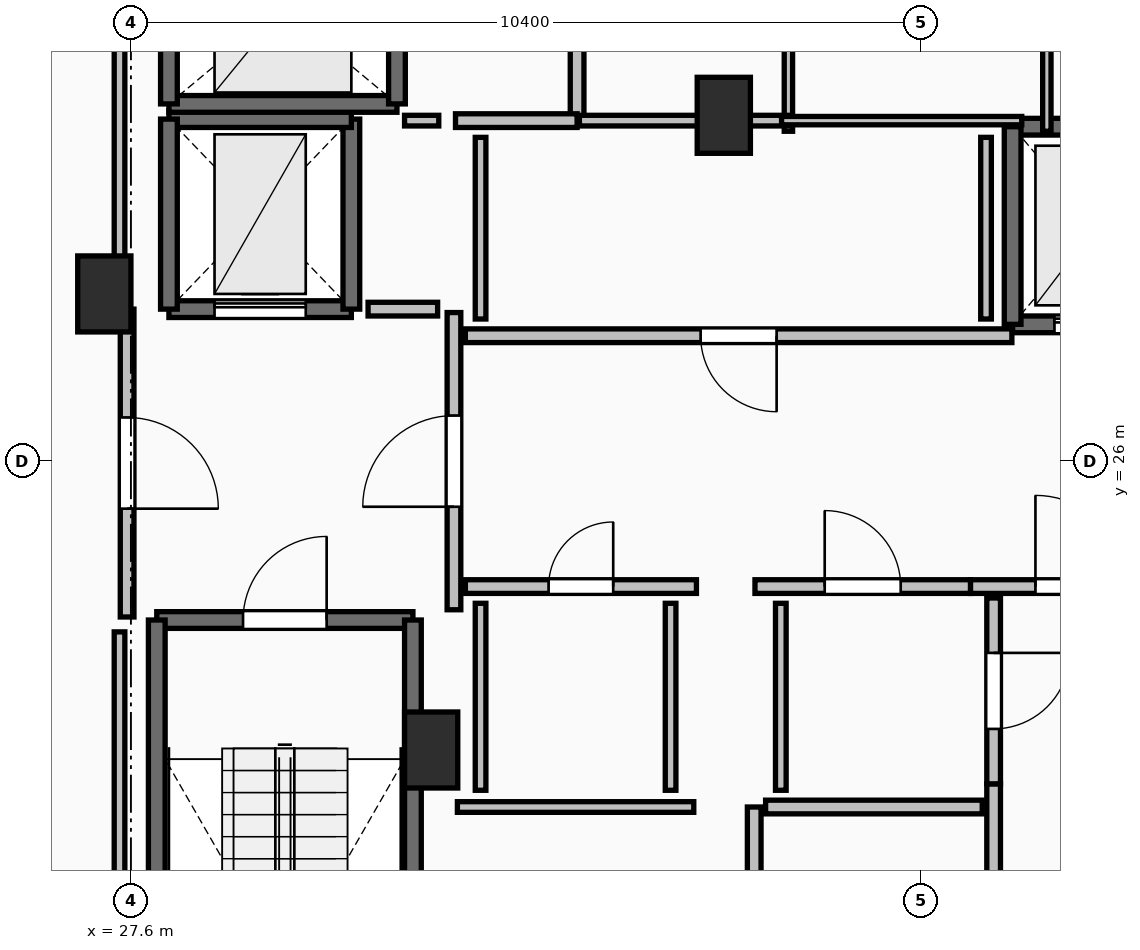
"""IFC4 building model, lengths in metres.
Left out: names, types, materials, properties, quantities, classifications, styles, units other than length and angle.
Written with IfcOpenShell. Run it as: python <this file> out.ifc"""

import sys

from ifc_helpers import new_model, si_unit, direction, frame, frame_2d, origin, origin_2d, place, context, subcontext, project, spatial, rectangle, extrude, element, fill, save


model = new_model("IFC4")
c1 = context("Model", 3, precision=1e-05, world=origin(), true_north=direction((0.0, 1.0)))
c2 = subcontext(c1, "Body", "Model", "MODEL_VIEW")
j1 = project(units=[si_unit("LENGTHUNIT", "METRE"), si_unit("PLANEANGLEUNIT", "RADIAN")], contexts=[c1])
p1 = place(None, origin())
s1 = spatial("IfcSite", under=j1, at=p1, CompositionType="ELEMENT")
p2 = place(p1, origin())
s2 = spatial("IfcBuilding", under=s1, at=p2, CompositionType="ELEMENT")
p3 = place(p2, frame((0.0, 0.0, 252.0)))
s3 = spatial("IfcBuildingStorey", under=s2, at=p3, CompositionType="ELEMENT", Elevation=252.0)
for number, where, z_axis, x_axis in (
    (1, (27.25, 28.2, 0.0), (0.0, 0.0, 1.0), (1.0, 0.0, 0.0)),
    (2, (31.55, 22.2, 0.0), (0.0, 0.0, 1.0), (1.0, 0.0, 0.0)),
    (3, (35.4, 30.55, 0.0), (0.0, 0.0, 1.0), (1.0, 0.0, 0.0)),
):
    element("IfcColumn", number, at=place(p3, frame(where, z_axis=z_axis, x_axis=x_axis)), inside=s3, PredefinedType="PILASTER", context=c2, shape_type="SweptSolid", body=[
        extrude(rectangle(XDim=0.7, YDim=1.0, at=origin_2d()), origin(), (0.0, 0.0, 1.0), 3.55),
    ])
p4 = place(p3, frame((27.94, 23.91, 0.0), z_axis=(0.0, 0.0, 1.0), x_axis=(1.0, 0.0, 0.0)))
e4 = element("IfcWall", 4, at=p4, inside=s3, PredefinedType="SOLIDWALL", context=c2, shape_type="SweptSolid", body=[
    extrude(rectangle(XDim=3.37, YDim=0.22, at=frame_2d((1.685, 0.0))), origin(), (0.0, 0.0, 1.0), 3.29),
])
p5 = place(p4, frame((1.135, 0.0, 0.0)))
e5 = element("IfcOpeningElement", 5, at=p5, cuts=e4, PredefinedType="OPENING", context=c2, shape_type="SweptSolid", body=[
    extrude(rectangle(XDim=1.1, YDim=2.15, at=frame_2d((0.55, 1.075))), frame((0.0, 0.125, 0.0), z_axis=(0.0, -1.0, 0.0), x_axis=(1.0, 0.0, 0.0)), (0.0, 0.0, 1.0), 0.25),
])
for number, where, z_axis, x_axis in (
    (6, (31.31, 23.91, 0.0), (0.0, 0.0, 1.0), (0.0, -1.0, 0.0)),
    (7, (27.94, 16.49, 0.0), (0.0, 0.0, 1.0), (0.0, 1.0, 0.0)),
):
    element("IfcWall", number, at=place(p3, frame(where, z_axis=z_axis, x_axis=x_axis)), inside=s3, PredefinedType="SOLIDWALL", context=c2, shape_type="SweptSolid", body=[
        extrude(rectangle(XDim=7.42, YDim=0.22, at=frame_2d((3.71, 0.0))), origin(), (0.0, 0.0, 1.0), 3.29),
    ])
p6 = place(p3, frame((39.2, 27.8, 0.0), z_axis=(0.0, 0.0, 1.0), x_axis=(1.0, 0.0, 0.0)))
e8 = element("IfcWall", 8, at=p6, inside=s3, PredefinedType="SOLIDWALL", context=c2, shape_type="SweptSolid", body=[
    extrude(rectangle(XDim=2.2, YDim=0.22, at=frame_2d((1.1, 0.0))), origin(), (0.0, 0.0, 1.0), 3.29),
])
p7 = place(p6, frame((0.55, 0.0, 0.0)))
e9 = element("IfcOpeningElement", 9, at=p7, cuts=e8, PredefinedType="OPENING", context=c2, shape_type="SweptSolid", body=[
    extrude(rectangle(XDim=1.1, YDim=2.2, at=frame_2d((0.55, 1.1))), frame((0.0, 0.125, 0.0), z_axis=(0.0, -1.0, 0.0), x_axis=(1.0, 0.0, 0.0)), (0.0, 0.0, 1.0), 0.25),
])
p8 = place(p3, frame((41.4, 30.4, 0.0), z_axis=(0.0, 0.0, 1.0), x_axis=(-1.0, 0.0, 0.0)))
e10 = element("IfcWall", 10, at=p8, inside=s3, PredefinedType="SOLIDWALL", context=c2, shape_type="SweptSolid", body=[
    extrude(rectangle(XDim=2.2, YDim=0.22, at=frame_2d((1.1, 0.0))), origin(), (0.0, 0.0, 1.0), 3.29),
])
p9 = place(p3, frame((39.2, 30.4, 0.0), z_axis=(0.0, 0.0, 1.0), x_axis=(0.0, -1.0, 0.0)))
e11 = element("IfcWall", 11, at=p9, inside=s3, PredefinedType="SOLIDWALL", context=c2, shape_type="SweptSolid", body=[
    extrude(rectangle(XDim=2.6, YDim=0.22, at=frame_2d((1.3, 0.0))), origin(), (0.0, 0.0, 1.0), 3.29),
])
p10 = place(p3, frame((28.1, 28.0, 0.0), z_axis=(0.0, 0.0, 1.0), x_axis=(1.0, 0.0, 0.0)))
e12 = element("IfcWall", 12, at=p10, inside=s3, PredefinedType="SHEAR", context=c2, shape_type="SweptSolid", body=[
    extrude(rectangle(XDim=2.4, YDim=0.22, at=frame_2d((1.2, 0.0))), origin(), (0.0, 0.0, 1.0), 3.29),
])
p11 = place(p10, frame((0.6, 0.0, 0.0)))
e13 = element("IfcOpeningElement", 13, at=p11, cuts=e12, PredefinedType="OPENING", context=c2, shape_type="SweptSolid", body=[
    extrude(rectangle(XDim=1.2, YDim=2.2, at=frame_2d((0.6, 1.1))), frame((0.0, 0.125, 0.0), z_axis=(0.0, -1.0, 0.0), x_axis=(1.0, 0.0, 0.0)), (0.0, 0.0, 1.0), 0.25),
])
p12 = place(p3, frame((30.5, 28.0, 0.0), z_axis=(0.0, 0.0, 1.0), x_axis=(0.0, 1.0, 0.0)))
e14 = element("IfcWall", 14, at=p12, inside=s3, PredefinedType="SHEAR", context=c2, shape_type="SweptSolid", body=[
    extrude(rectangle(XDim=2.5, YDim=0.22, at=frame_2d((1.25, 0.0))), origin(), (0.0, 0.0, 1.0), 3.29),
])
p13 = place(p3, frame((30.5, 30.5, 0.0), z_axis=(0.0, 0.0, 1.0), x_axis=(-1.0, 0.0, 0.0)))
e15 = element("IfcWall", 15, at=p13, inside=s3, PredefinedType="SHEAR", context=c2, shape_type="SweptSolid", body=[
    extrude(rectangle(XDim=2.4, YDim=0.22, at=frame_2d((1.2, 0.0))), origin(), (0.0, 0.0, 1.0), 3.29),
])
p14 = place(p3, frame((28.1, 30.5, 0.0), z_axis=(0.0, 0.0, 1.0), x_axis=(0.0, -1.0, 0.0)))
e16 = element("IfcWall", 16, at=p14, inside=s3, PredefinedType="SHEAR", context=c2, shape_type="SweptSolid", body=[
    extrude(rectangle(XDim=2.5, YDim=0.22, at=frame_2d((1.25, 0.0))), origin(), (0.0, 0.0, 1.0), 3.29),
])
p15 = place(p3, frame((28.1, 30.7, 0.0), z_axis=(0.0, 0.0, 1.0), x_axis=(1.0, 0.0, 0.0)))
e17 = element("IfcWall", 17, at=p15, inside=s3, PredefinedType="SOLIDWALL", context=c2, shape_type="SweptSolid", body=[
    extrude(rectangle(XDim=3.0, YDim=0.22, at=frame_2d((1.5, 0.0))), origin(), (0.0, 0.0, 1.0), 3.29),
])
for number, where, z_axis, x_axis in (
    (18, (31.1, 30.7, 0.0), (0.0, 0.0, 1.0), (0.0, 1.0, 0.0)),
    (19, (28.1, 33.2, 0.0), (0.0, 0.0, 1.0), (0.0, -1.0, 0.0)),
):
    element("IfcWall", number, at=place(p3, frame(where, z_axis=z_axis, x_axis=x_axis)), inside=s3, PredefinedType="SOLIDWALL", context=c2, shape_type="SweptSolid", body=[
        extrude(rectangle(XDim=2.5, YDim=0.22, at=frame_2d((1.25, 0.0))), origin(), (0.0, 0.0, 1.0), 3.29),
    ])
p16 = place(p3, frame((31.85, 24.045, 0.0), z_axis=(0.0, 0.0, 1.0), x_axis=(0.0, 1.0, 0.0)))
e20 = element("IfcWall", 20, at=p16, inside=s3, PredefinedType="PARTITIONING", context=c2, shape_type="SweptSolid", body=[
    extrude(rectangle(XDim=3.91, YDim=0.18, at=frame_2d((1.955, 0.0))), origin(), (0.0, 0.0, 1.0), 3.29),
])
p17 = place(p16, frame((1.355, 0.0, 0.0)))
e21 = element("IfcOpeningElement", 21, at=p17, cuts=e20, PredefinedType="OPENING", context=c2, shape_type="SweptSolid", body=[
    extrude(rectangle(XDim=1.2, YDim=2.15, at=frame_2d((0.6, 1.075))), frame((0.0, 0.105, 0.0), z_axis=(0.0, -1.0, 0.0), x_axis=(1.0, 0.0, 0.0)), (0.0, 0.0, 1.0), 0.21),
])
p18 = place(p3, frame((27.55, 28.0, 0.0), z_axis=(0.0, 0.0, 1.0), x_axis=(0.0, -1.0, 0.0)))
e22 = element("IfcWall", 22, at=p18, inside=s3, PredefinedType="PARTITIONING", context=c2, shape_type="SweptSolid", body=[
    extrude(rectangle(XDim=4.05, YDim=0.18, at=frame_2d((2.025, 0.0))), origin(), (0.0, 0.0, 1.0), 3.29),
])
p19 = place(p18, frame((1.425, 0.0, 0.0)))
e23 = element("IfcOpeningElement", 23, at=p19, cuts=e22, PredefinedType="OPENING", context=c2, shape_type="SweptSolid", body=[
    extrude(rectangle(XDim=1.2, YDim=2.15, at=frame_2d((0.6, 1.075))), frame((0.0, 0.105, 0.0), z_axis=(0.0, -1.0, 0.0), x_axis=(1.0, 0.0, 0.0)), (0.0, 0.0, 1.0), 0.21),
])
p20 = place(p3, frame((33.47, 30.48, 0.0), z_axis=(0.0, 0.0, 1.0), x_axis=(0.0, 1.0, 0.0)))
e24 = element("IfcWall", 24, at=p20, inside=s3, PredefinedType="PARTITIONING", context=c2, shape_type="SweptSolid", body=[
    extrude(rectangle(XDim=3.28, YDim=0.18, at=frame_2d((1.64, 0.0))), origin(), (0.0, 0.0, 1.0), 3.29),
])
p21 = place(p20, frame((1.215, 0.0, 0.0)))
e25 = element("IfcOpeningElement", 25, at=p21, cuts=e24, PredefinedType="OPENING", context=c2, shape_type="SweptSolid", body=[
    extrude(rectangle(XDim=0.85, YDim=2.1, at=frame_2d((0.425, 1.05))), frame((0.0, 0.105, 0.0), z_axis=(0.0, -1.0, 0.0), x_axis=(1.0, 0.0, 0.0)), (0.0, 0.0, 1.0), 0.21),
])
p22 = place(p3, frame((31.87, 30.48, 0.0), z_axis=(0.0, 0.0, 1.0), x_axis=(1.0, 0.0, 0.0)))
e26 = element("IfcWall", 26, at=p22, inside=s3, PredefinedType="PARTITIONING", context=c2, shape_type="SweptSolid", body=[
    extrude(rectangle(XDim=1.6, YDim=0.18, at=frame_2d((0.8, 0.0))), origin(), (0.0, 0.0, 1.0), 3.29),
])
p23 = place(p3, frame((38.645, 24.35, 0.0), z_axis=(0.0, 0.0, 1.0), x_axis=(1.0, 0.0, 0.0)))
e27 = element("IfcWall", 27, at=p23, inside=s3, PredefinedType="PARTITIONING", context=c2, shape_type="SweptSolid", body=[
    extrude(rectangle(XDim=2.91, YDim=0.18, at=frame_2d((1.455, 0.0))), origin(), (0.0, 0.0, 1.0), 3.29),
])
p24 = place(p23, frame((0.855, 0.0, 0.0)))
e28 = element("IfcOpeningElement", 28, at=p24, cuts=e27, PredefinedType="OPENING", context=c2, shape_type="SweptSolid", body=[
    extrude(rectangle(XDim=1.2, YDim=2.15, at=frame_2d((0.6, 1.075))), frame((0.0, 0.105, 0.0), z_axis=(0.0, -1.0, 0.0), x_axis=(1.0, 0.0, 0.0)), (0.0, 0.0, 1.0), 0.21),
])
p25 = place(p3, frame((39.19, 27.65, 0.0), z_axis=(0.0, 0.0, 1.0), x_axis=(-1.0, 0.0, 0.0)))
e29 = element("IfcWall", 29, at=p25, inside=s3, PredefinedType="PARTITIONING", context=c2, shape_type="SweptSolid", body=[
    extrude(rectangle(XDim=7.19, YDim=0.18, at=frame_2d((3.595, 0.0))), origin(), (0.0, 0.0, 1.0), 3.29),
])
p26 = place(p25, frame((3.095, 0.0, 0.0)))
e30 = element("IfcOpeningElement", 30, at=p26, cuts=e29, PredefinedType="OPENING", context=c2, shape_type="SweptSolid", body=[
    extrude(rectangle(XDim=1.0, YDim=2.15, at=frame_2d((0.5, 1.075))), frame((0.0, 0.105, 0.0), z_axis=(0.0, -1.0, 0.0), x_axis=(1.0, 0.0, 0.0)), (0.0, 0.0, 1.0), 0.21),
])
p27 = place(p3, frame((32.0, 24.35, 0.0), z_axis=(0.0, 0.0, 1.0), x_axis=(1.0, 0.0, 0.0)))
e31 = element("IfcWall", 31, at=p27, inside=s3, PredefinedType="PARTITIONING", context=c2, shape_type="SweptSolid", body=[
    extrude(rectangle(XDim=3.04, YDim=0.18, at=frame_2d((1.52, 0.0))), origin(), (0.0, 0.0, 1.0), 3.29),
])
p28 = place(p27, frame((1.095, 0.0, 0.0)))
e32 = element("IfcOpeningElement", 32, at=p28, cuts=e31, PredefinedType="OPENING", context=c2, shape_type="SweptSolid", body=[
    extrude(rectangle(XDim=0.85, YDim=2.1, at=frame_2d((0.425, 1.05))), frame((0.0, 0.105, 0.0), z_axis=(0.0, -1.0, 0.0), x_axis=(1.0, 0.0, 0.0)), (0.0, 0.0, 1.0), 0.21),
])
p29 = place(p3, frame((35.81, 24.35, 0.0), z_axis=(0.0, 0.0, 1.0), x_axis=(1.0, 0.0, 0.0)))
e33 = element("IfcWall", 33, at=p29, inside=s3, PredefinedType="PARTITIONING", context=c2, shape_type="SweptSolid", body=[
    extrude(rectangle(XDim=2.835, YDim=0.18, at=frame_2d((1.417, 0.0))), origin(), (0.0, 0.0, 1.0), 3.29),
])
p30 = place(p29, frame((0.917, 0.0, 0.0)))
e34 = element("IfcOpeningElement", 34, at=p30, cuts=e33, PredefinedType="OPENING", context=c2, shape_type="SweptSolid", body=[
    extrude(rectangle(XDim=1.0, YDim=2.15, at=frame_2d((0.5, 1.075))), frame((0.0, 0.105, 0.0), z_axis=(0.0, -1.0, 0.0), x_axis=(1.0, 0.0, 0.0)), (0.0, 0.0, 1.0), 0.21),
])
p31 = place(p3, frame((38.95, 21.755, 0.0), z_axis=(0.0, 0.0, 1.0), x_axis=(0.0, -1.0, 0.0)))
e35 = element("IfcWall", 35, at=p31, inside=s3, PredefinedType="PARTITIONING", context=c2, shape_type="SweptSolid", body=[
    extrude(rectangle(XDim=5.435, YDim=0.18, at=frame_2d((2.717, 0.0))), origin(), (0.0, 0.0, 1.0), 3.29),
])
p32 = place(p31, frame((2.018, 0.0, 0.0)))
e36 = element("IfcOpeningElement", 36, at=p32, cuts=e35, PredefinedType="OPENING", context=c2, shape_type="SweptSolid", body=[
    extrude(rectangle(XDim=1.4, YDim=2.2, at=frame_2d((0.7, 1.1))), frame((0.0, 0.105, 0.0), z_axis=(0.0, -1.0, 0.0), x_axis=(1.0, 0.0, 0.0)), (0.0, 0.0, 1.0), 0.21),
])
p33 = place(p3, frame((38.95, 24.2, 0.0), z_axis=(0.0, 0.0, 1.0), x_axis=(0.0, -1.0, 0.0)))
e37 = element("IfcWall", 37, at=p33, inside=s3, PredefinedType="PARTITIONING", context=c2, shape_type="SweptSolid", body=[
    extrude(rectangle(XDim=2.445, YDim=0.18, at=frame_2d((1.223, 0.0))), origin(), (0.0, 0.0, 1.0), 2.482),
])
p34 = place(p33, frame((0.722, 0.0, 0.0)))
e38 = element("IfcOpeningElement", 38, at=p34, cuts=e37, PredefinedType="OPENING", context=c2, shape_type="SweptSolid", body=[
    extrude(rectangle(XDim=1.0, YDim=2.15, at=frame_2d((0.5, 1.075))), frame((0.0, 0.105, 0.0), z_axis=(0.0, -1.0, 0.0), x_axis=(1.0, 0.0, 0.0)), (0.0, 0.0, 1.0), 0.21),
])
p35 = place(p3, frame((36.25, 30.34, 0.0), z_axis=(0.0, 0.0, 1.0), x_axis=(0.0, 1.0, 0.0)))
e39 = element("IfcWall", 39, at=p35, inside=s3, PredefinedType="PARTITIONING", context=c2, shape_type="SweptSolid", body=[
    extrude(rectangle(XDim=3.56, YDim=0.11, at=frame_2d((1.78, 0.0))), origin(), (0.0, 0.0, 1.0), 2.482),
])
p36 = place(p3, frame((33.5, 30.48, 0.0), z_axis=(0.0, 0.0, 1.0), x_axis=(1.0, 0.0, 0.0)))
e40 = element("IfcWall", 40, at=p36, inside=s3, PredefinedType="PARTITIONING", context=c2, shape_type="SweptSolid", body=[
    extrude(rectangle(XDim=2.75, YDim=0.14, at=frame_2d((1.375, 0.0))), origin(), (0.0, 0.0, 1.0), 2.482),
])
p37 = place(p3, frame((39.65, 30.34, 0.0), z_axis=(0.0, 0.0, 1.0), x_axis=(0.0, 1.0, 0.0)))
e41 = element("IfcWall", 41, at=p37, inside=s3, PredefinedType="PARTITIONING", context=c2, shape_type="SweptSolid", body=[
    extrude(rectangle(XDim=3.56, YDim=0.11, at=frame_2d((1.78, 0.0))), origin(), (0.0, 0.0, 1.0), 2.482),
])
p38 = place(p3, frame((36.16, 30.48, 0.0), z_axis=(0.0, 0.0, 1.0), x_axis=(1.0, 0.0, 0.0)))
e42 = element("IfcWall", 42, at=p38, inside=s3, PredefinedType="PARTITIONING", context=c2, shape_type="SweptSolid", body=[
    extrude(rectangle(XDim=3.16, YDim=0.11, at=frame_2d((1.58, 0.0))), origin(), (0.0, 0.0, 1.0), 2.482),
])
p39 = place(p3, frame((35.8, 16.32, 0.0), z_axis=(0.0, 0.0, 1.0), x_axis=(0.0, 1.0, 0.0)))
e43 = element("IfcWall", 43, at=p39, inside=s3, PredefinedType="PARTITIONING", context=c2, shape_type="SweptSolid", body=[
    extrude(rectangle(XDim=5.13, YDim=0.18, at=frame_2d((2.565, 0.0))), origin(), (0.0, 0.0, 1.0), 3.29),
])
p40 = place(p3, frame((35.005, 21.45, 0.0), z_axis=(0.0, 0.0, 1.0), x_axis=(-1.0, 0.0, 0.0)))
e44 = element("IfcWall", 44, at=p40, inside=s3, PredefinedType="PARTITIONING", context=c2, shape_type="SweptSolid", body=[
    extrude(rectangle(XDim=3.11, YDim=0.14, at=frame_2d((1.555, 0.0))), origin(), (0.0, 0.0, 1.0), 3.29),
])
p41 = place(p3, frame((38.8, 21.45, 0.0), z_axis=(0.0, 0.0, 1.0), x_axis=(-1.0, 0.0, 0.0)))
e45 = element("IfcWall", 45, at=p41, inside=s3, PredefinedType="PARTITIONING", context=c2, shape_type="SweptSolid", body=[
    extrude(rectangle(XDim=2.85, YDim=0.18, at=frame_2d((1.425, 0.0))), origin(), (0.0, 0.0, 1.0), 3.29),
])
p42 = place(p3, frame((31.635, 28.0, 0.0), z_axis=(0.0, 0.0, 1.0), x_axis=(-1.0, 0.0, 0.0)))
e46 = element("IfcWall", 46, at=p42, inside=s3, PredefinedType="PARTITIONING", context=c2, shape_type="SweptSolid", body=[
    extrude(rectangle(XDim=0.915, YDim=0.18, at=frame_2d((0.458, 0.0))), origin(), (0.0, 0.0, 1.0), 3.29),
])
p43 = place(p3, frame((31.2, 30.48, 0.0), z_axis=(0.0, 0.0, 1.0), x_axis=(1.0, 0.0, 0.0)))
e47 = element("IfcWall", 47, at=p43, inside=s3, PredefinedType="PARTITIONING", context=c2, shape_type="SweptSolid", body=[
    extrude(rectangle(XDim=0.45, YDim=0.14, at=frame_2d((0.225, 0.0))), origin(), (0.0, 0.0, 1.0), 3.29),
])
for number, where, z_axis, x_axis in (
    (48, (32.2, 30.26, 0.0), (0.0, 0.0, 1.0), (0.0, -1.0, 0.0)),
    (49, (38.85, 27.87, 0.0), (0.0, 0.0, 1.0), (0.0, 1.0, 0.0)),
):
    element("IfcWall", number, at=place(p3, frame(where, z_axis=z_axis, x_axis=x_axis)), inside=s3, PredefinedType="PARTITIONING", context=c2, shape_type="SweptSolid", body=[
        extrude(rectangle(XDim=2.39, YDim=0.14, at=frame_2d((1.195, 0.0))), origin(), (0.0, 0.0, 1.0), 3.29),
    ])
for number, where, z_axis, x_axis in (
    (50, (32.2, 24.13, 0.0), (0.0, 0.0, 1.0), (0.0, -1.0, 0.0)),
    (51, (34.7, 21.67, 0.0), (0.0, 0.0, 1.0), (0.0, 1.0, 0.0)),
    (52, (36.15, 24.13, 0.0), (0.0, 0.0, 1.0), (0.0, -1.0, 0.0)),
):
    element("IfcWall", number, at=place(p3, frame(where, z_axis=z_axis, x_axis=x_axis)), inside=s3, PredefinedType="PARTITIONING", context=c2, shape_type="SweptSolid", body=[
        extrude(rectangle(XDim=2.46, YDim=0.14, at=frame_2d((1.23, 0.0))), origin(), (0.0, 0.0, 1.0), 2.482),
    ])
p44 = place(p3, frame((27.45, 33.45, 0.0), z_axis=(0.0, 0.0, 1.0), x_axis=(0.0, -1.0, 0.0)))
e53 = element("IfcWall", 53, at=p44, inside=s3, PredefinedType="PARTITIONING", context=c2, shape_type="SweptSolid", body=[
    extrude(rectangle(XDim=5.254, YDim=0.14, at=frame_2d((2.627, 0.0))), origin(), (0.0, 0.0, 1.0), 2.482),
])
p45 = place(p3, frame((27.45, 23.754, 0.0), z_axis=(0.0, 0.0, 1.0), x_axis=(0.0, -1.0, 0.0)))
e54 = element("IfcWall", 54, at=p45, inside=s3, PredefinedType="PARTITIONING", context=c2, shape_type="SweptSolid", body=[
    extrude(rectangle(XDim=7.514, YDim=0.14, at=frame_2d((3.757, 0.0))), origin(), (0.0, 0.0, 1.0), 2.482),
])
p46 = place(p5, origin())
e55 = element("IfcDoor", 55, at=p46, inside=s3, OperationType="SINGLE_SWING_RIGHT", PredefinedType="DOOR", context=c2, shape_type="SweptSolid", body=[
    extrude(rectangle(XDim=1.1, YDim=2.15, at=frame_2d((0.55, 1.075))), frame((0.0, 0.025, 0.0), z_axis=(0.0, -1.0, 0.0), x_axis=(1.0, 0.0, 0.0)), (0.0, 0.0, 1.0), 0.05),
])
fill(e5, e55)
p47 = place(p7, origin())
e56 = element("IfcDoor", 56, at=p47, inside=s3, OperationType="SLIDING_TO_LEFT", PredefinedType="DOOR", context=c2, shape_type="SweptSolid", body=[
    extrude(rectangle(XDim=1.1, YDim=2.2, at=frame_2d((0.55, 1.1))), frame((0.0, 0.025, 0.0), z_axis=(0.0, -1.0, 0.0), x_axis=(1.0, 0.0, 0.0)), (0.0, 0.0, 1.0), 0.05),
])
fill(e9, e56)
p48 = place(p11, origin())
e57 = element("IfcDoor", 57, at=p48, inside=s3, OperationType="SLIDING_TO_LEFT", PredefinedType="DOOR", context=c2, shape_type="SweptSolid", body=[
    extrude(rectangle(XDim=1.2, YDim=2.2, at=frame_2d((0.6, 1.1))), frame((0.0, 0.025, 0.0), z_axis=(0.0, -1.0, 0.0), x_axis=(1.0, 0.0, 0.0)), (0.0, 0.0, 1.0), 0.05),
])
fill(e13, e57)
p49 = place(p17, origin())
e58 = element("IfcDoor", 58, at=p49, inside=s3, OperationType="SINGLE_SWING_LEFT", PredefinedType="DOOR", context=c2, shape_type="SweptSolid", body=[
    extrude(rectangle(XDim=1.2, YDim=2.15, at=frame_2d((0.6, 1.075))), frame((0.0, 0.025, 0.0), z_axis=(0.0, -1.0, 0.0), x_axis=(1.0, 0.0, 0.0)), (0.0, 0.0, 1.0), 0.05),
])
fill(e21, e58)
p50 = place(p19, origin())
e59 = element("IfcDoor", 59, at=p50, inside=s3, OperationType="SINGLE_SWING_RIGHT", PredefinedType="DOOR", context=c2, shape_type="SweptSolid", body=[
    extrude(rectangle(XDim=1.2, YDim=2.15, at=frame_2d((0.6, 1.075))), frame((0.0, 0.025, 0.0), z_axis=(0.0, -1.0, 0.0), x_axis=(1.0, 0.0, 0.0)), (0.0, 0.0, 1.0), 0.05),
])
fill(e23, e59)
p51 = place(p24, origin())
e60 = element("IfcDoor", 60, at=p51, inside=s3, OperationType="SINGLE_SWING_LEFT", PredefinedType="DOOR", context=c2, shape_type="SweptSolid", body=[
    extrude(rectangle(XDim=1.2, YDim=2.15, at=frame_2d((0.6, 1.075))), frame((0.0, 0.025, 0.0), z_axis=(0.0, -1.0, 0.0), x_axis=(1.0, 0.0, 0.0)), (0.0, 0.0, 1.0), 0.05),
])
fill(e28, e60)
p52 = place(p26, origin())
e61 = element("IfcDoor", 61, at=p52, inside=s3, OperationType="SINGLE_SWING_LEFT", PredefinedType="DOOR", context=c2, shape_type="SweptSolid", body=[
    extrude(rectangle(XDim=1.0, YDim=2.15, at=frame_2d((0.5, 1.075))), frame((0.0, 0.025, 0.0), z_axis=(0.0, -1.0, 0.0), x_axis=(1.0, 0.0, 0.0)), (0.0, 0.0, 1.0), 0.05),
])
fill(e30, e61)
p53 = place(p28, origin())
e62 = element("IfcDoor", 62, at=p53, inside=s3, OperationType="SINGLE_SWING_RIGHT", PredefinedType="DOOR", context=c2, shape_type="SweptSolid", body=[
    extrude(rectangle(XDim=0.85, YDim=2.1, at=frame_2d((0.425, 1.05))), frame((0.0, 0.025, 0.0), z_axis=(0.0, -1.0, 0.0), x_axis=(1.0, 0.0, 0.0)), (0.0, 0.0, 1.0), 0.05),
])
fill(e32, e62)
p54 = place(p30, origin())
e63 = element("IfcDoor", 63, at=p54, inside=s3, OperationType="SINGLE_SWING_LEFT", PredefinedType="DOOR", context=c2, shape_type="SweptSolid", body=[
    extrude(rectangle(XDim=1.0, YDim=2.15, at=frame_2d((0.5, 1.075))), frame((0.0, 0.025, 0.0), z_axis=(0.0, -1.0, 0.0), x_axis=(1.0, 0.0, 0.0)), (0.0, 0.0, 1.0), 0.05),
])
fill(e34, e63)
p55 = place(p34, origin())
e64 = element("IfcDoor", 64, at=p55, inside=s3, OperationType="SINGLE_SWING_LEFT", PredefinedType="DOOR", context=c2, shape_type="SweptSolid", body=[
    extrude(rectangle(XDim=1.0, YDim=2.15, at=frame_2d((0.5, 1.075))), frame((0.0, 0.025, 0.0), z_axis=(0.0, -1.0, 0.0), x_axis=(1.0, 0.0, 0.0)), (0.0, 0.0, 1.0), 0.05),
])
fill(e38, e64)
save(model, sys.argv[1])
